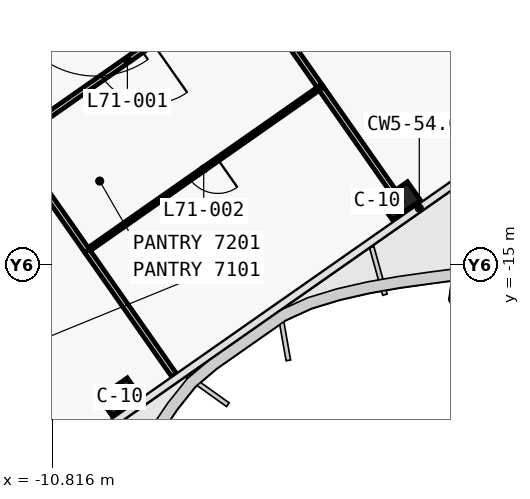
"""IFC4 building model, lengths in metres.
Left out: names, types, materials, properties, quantities, classifications, styles, units other than length and angle.
Written with IfcOpenShell. Run it as: python <this file> out.ifc"""

import sys

from ifc_helpers import new_model, si_unit, direction, frame, frame_2d, origin, origin_2d, place, context, subcontext, project, spatial, polyline, rectangle, outline, extrude, element, fill, save


model = new_model("IFC4")
c1 = context("Model", 3, precision=1e-05, world=origin(), true_north=direction((0.0, 1.0)))
c2 = subcontext(c1, "Body", "Model", "MODEL_VIEW")
j1 = project(units=[si_unit("LENGTHUNIT", "METRE"), si_unit("PLANEANGLEUNIT", "RADIAN")], contexts=[c1])
p1 = place(None, origin())
s1 = spatial("IfcSite", under=j1, at=p1, CompositionType="ELEMENT")
p2 = place(p1, origin())
s2 = spatial("IfcBuilding", under=s1, at=p2, CompositionType="ELEMENT")
p3 = place(p2, frame((0.0, 0.0, 299.5)))
s3 = spatial("IfcBuildingStorey", under=s2, at=p3, CompositionType="ELEMENT", Elevation=299.5)
p4 = place(p3, frame((-0.028, -0.874, 0.0), z_axis=(0.0, 0.0, 1.0), x_axis=(-0.819150035022, -0.573579305871, 0.0)))
e1 = element("IfcWall", 1, at=p4, inside=s3, PredefinedType="SHEAR", context=c2, shape_type="SweptSolid", body=[
    extrude(outline(polyline([(26.476, 0.3), (0.42, 0.3), (0.0, -0.3), (26.476, -0.3), (26.476, 0.3)])), origin(), (0.0, 0.0, 1.0), 3.9),
])
p5 = place(p4, frame((2.976, 0.0, 0.0)))
e2 = element("IfcOpeningElement", 2, at=p5, cuts=e1, PredefinedType="OPENING", context=c2, shape_type="SweptSolid", body=[
    extrude(rectangle(XDim=2.4, YDim=2.1, at=frame_2d((1.2, 1.05))), frame((0.0, 0.31, 0.0), z_axis=(0.0, -1.0, 0.0), x_axis=(1.0, 0.0, 0.0)), (0.0, 0.0, 1.0), 0.62),
])
p6 = place(p4, frame((11.776, 0.0, 0.0)))
e3 = element("IfcOpeningElement", 3, at=p6, cuts=e1, PredefinedType="OPENING", context=c2, shape_type="SweptSolid", body=[
    extrude(rectangle(XDim=2.4, YDim=2.1, at=frame_2d((1.2, 1.05))), frame((0.0, 0.31, 0.0), z_axis=(0.0, -1.0, 0.0), x_axis=(1.0, 0.0, 0.0)), (0.0, 0.0, 1.0), 0.62),
])
p7 = place(p3, frame((-2.638, 3.768, 0.0), z_axis=(0.0, 0.0, 1.0), x_axis=(-0.819155014212, -0.573572194837, 0.0)))
e4 = element("IfcWall", 4, at=p7, inside=s3, PredefinedType="SHEAR", context=c2, shape_type="SweptSolid", body=[
    extrude(outline(polyline([(26.4, 0.15), (0.0, 0.15), (0.0, -0.15), (26.4, -0.15), (26.4, 0.15)])), origin(), (0.0, 0.0, 1.0), 3.9),
])
p8 = place(p7, frame((1.169, 0.0, 0.0)))
e5 = element("IfcOpeningElement", 5, at=p8, cuts=e4, PredefinedType="OPENING", context=c2, shape_type="SweptSolid", body=[
    extrude(rectangle(XDim=1.1, YDim=2.1, at=frame_2d((0.55, 1.05))), frame((0.0, 0.16, 0.0), z_axis=(0.0, -1.0, 0.0), x_axis=(1.0, 0.0, 0.0)), (0.0, 0.0, 1.0), 0.32),
])
p9 = place(p7, frame((3.206, 0.0, 0.0)))
e6 = element("IfcOpeningElement", 6, at=p9, cuts=e4, PredefinedType="OPENING", context=c2, shape_type="SweptSolid", body=[
    extrude(rectangle(XDim=1.1, YDim=2.1, at=frame_2d((0.55, 1.05))), frame((0.0, 0.16, 0.0), z_axis=(0.0, -1.0, 0.0), x_axis=(1.0, 0.0, 0.0)), (0.0, 0.0, 1.0), 0.32),
])
p10 = place(p7, frame((5.244, 0.0, 0.0)))
e7 = element("IfcOpeningElement", 7, at=p10, cuts=e4, PredefinedType="OPENING", context=c2, shape_type="SweptSolid", body=[
    extrude(rectangle(XDim=1.1, YDim=2.1, at=frame_2d((0.55, 1.05))), frame((0.0, 0.16, 0.0), z_axis=(0.0, -1.0, 0.0), x_axis=(1.0, 0.0, 0.0)), (0.0, 0.0, 1.0), 0.32),
])
p11 = place(p7, frame((7.281, 0.0, 0.0)))
e8 = element("IfcOpeningElement", 8, at=p11, cuts=e4, PredefinedType="OPENING", context=c2, shape_type="SweptSolid", body=[
    extrude(rectangle(XDim=1.1, YDim=2.1, at=frame_2d((0.55, 1.05))), frame((0.0, 0.16, 0.0), z_axis=(0.0, -1.0, 0.0), x_axis=(1.0, 0.0, 0.0)), (0.0, 0.0, 1.0), 0.32),
])
p12 = place(p7, frame((9.688, 0.0, 0.0)))
e9 = element("IfcOpeningElement", 9, at=p12, cuts=e4, PredefinedType="OPENING", context=c2, shape_type="SweptSolid", body=[
    extrude(rectangle(XDim=1.1, YDim=2.1, at=frame_2d((0.55, 1.05))), frame((0.0, 0.16, 0.0), z_axis=(0.0, -1.0, 0.0), x_axis=(1.0, 0.0, 0.0)), (0.0, 0.0, 1.0), 0.32),
])
p13 = place(p7, frame((11.863, 0.0, 0.0)))
e10 = element("IfcOpeningElement", 10, at=p13, cuts=e4, PredefinedType="OPENING", context=c2, shape_type="SweptSolid", body=[
    extrude(rectangle(XDim=1.1, YDim=2.1, at=frame_2d((0.55, 1.05))), frame((0.0, 0.16, 0.0), z_axis=(0.0, -1.0, 0.0), x_axis=(1.0, 0.0, 0.0)), (0.0, 0.0, 1.0), 0.32),
])
p14 = place(p7, frame((13.722, 0.0, 0.0)))
e11 = element("IfcOpeningElement", 11, at=p14, cuts=e4, PredefinedType="OPENING", context=c2, shape_type="SweptSolid", body=[
    extrude(rectangle(XDim=1.0, YDim=2.1, at=frame_2d((0.5, 1.05))), frame((0.0, 0.16, 0.0), z_axis=(0.0, -1.0, 0.0), x_axis=(1.0, 0.0, 0.0)), (0.0, 0.0, 1.0), 0.32),
])
p15 = place(p7, frame((15.798, 0.0, 0.0)))
e12 = element("IfcOpeningElement", 12, at=p15, cuts=e4, PredefinedType="OPENING", context=c2, shape_type="SweptSolid", body=[
    extrude(rectangle(XDim=1.0, YDim=2.1, at=frame_2d((0.5, 1.05))), frame((0.0, 0.16, 0.0), z_axis=(0.0, -1.0, 0.0), x_axis=(1.0, 0.0, 0.0)), (0.0, 0.0, 1.0), 0.32),
])
for number, where, z_axis, x_axis in (
    (13, (-1.665, -13.313, 0.0), (0.0, 0.0, 1.0), (-0.819, -0.574, 0.0)),
    (14, (-9.038, -18.475, 0.0), (0.0, 0.0, 1.0), (-0.819, -0.574, 0.0)),
):
    element("IfcColumn", number, at=place(p3, frame(where, z_axis=z_axis, x_axis=x_axis)), inside=s3, PredefinedType="COLUMN", context=c2, shape_type="SweptSolid", body=[
        extrude(rectangle(XDim=0.9, YDim=0.6, at=origin_2d()), origin(), (0.0, 0.0, 1.0), 3.9),
    ])
p16 = place(p3, frame((-5.766, -7.456, 0.0), z_axis=(0.0, 0.0, 1.0), x_axis=(-0.819150881364, -0.573578097177, 0.0)))
e15 = element("IfcWall", 15, at=p16, inside=s3, PredefinedType="PARTITIONING", context=c2, shape_type="SweptSolid", body=[
    extrude(rectangle(XDim=7.502, YDim=0.15, at=frame_2d((3.751, 0.0))), origin(), (0.0, 0.0, 1.0), 3.05),
])
p17 = place(p16, frame((2.951, 0.0, 0.0)))
e16 = element("IfcOpeningElement", 16, at=p17, cuts=e15, PredefinedType="OPENING", context=c2, shape_type="SweptSolid", body=[
    extrude(rectangle(XDim=1.6, YDim=2.1, at=frame_2d((0.8, 1.05))), frame((0.0, 0.085, 0.0), z_axis=(0.0, -1.0, 0.0), x_axis=(1.0, 0.0, 0.0)), (0.0, 0.0, 1.0), 0.17),
])
p18 = place(p3, frame((-1.849, -13.051, 0.0), z_axis=(0.0, 0.0, 1.0), x_axis=(-0.573600070244, 0.819135495151, 0.0)))
e17 = element("IfcWall", 17, at=p18, inside=s3, PredefinedType="PARTITIONING", context=c2, shape_type="SweptSolid", body=[
    extrude(rectangle(XDim=3.331, YDim=0.15, at=frame_2d((1.666, 0.0))), origin(), (0.0, 0.0, 1.0), 3.05),
])
p19 = place(p3, frame((-3.758, -10.324, 0.0), z_axis=(0.0, 0.0, 1.0), x_axis=(-0.573560539213, 0.819163175355, 0.0)))
e18 = element("IfcWall", 18, at=p19, inside=s3, PredefinedType="PARTITIONING", context=c2, shape_type="SweptSolid", body=[
    extrude(rectangle(XDim=3.504, YDim=0.15, at=frame_2d((1.752, 0.0))), origin(), (0.0, 0.0, 1.0), 3.05),
])
p20 = place(p3, frame((-3.758, -10.324, 0.0), z_axis=(0.0, 0.0, 1.0), x_axis=(-0.81915238829, -0.573575945067, 0.0)))
e19 = element("IfcWall", 19, at=p20, inside=s3, PredefinedType="PARTITIONING", context=c2, shape_type="SweptSolid", body=[
    extrude(rectangle(XDim=7.5, YDim=0.1, at=frame_2d((3.75, 0.0))), origin(), (0.0, 0.0, 1.0), 3.05),
])
p21 = place(p20, frame((3.3, 0.0, 0.0)))
e20 = element("IfcOpeningElement", 20, at=p21, cuts=e19, PredefinedType="OPENING", context=c2, shape_type="SweptSolid", body=[
    extrude(rectangle(XDim=0.9, YDim=2.1, at=frame_2d((0.45, 1.05))), frame((0.0, 0.06, 0.0), z_axis=(0.0, -1.0, 0.0), x_axis=(1.0, 0.0, 0.0)), (0.0, 0.0, 1.0), 0.12),
])
p22 = place(p3, frame((-7.608, -17.901, 0.0), z_axis=(0.0, 0.0, 1.0), x_axis=(-0.573560675104, 0.819163080207, 0.0)))
e21 = element("IfcWall", 21, at=p22, inside=s3, PredefinedType="PARTITIONING", context=c2, shape_type="SweptSolid", body=[
    extrude(rectangle(XDim=3.999, YDim=0.15, at=frame_2d((2.0, 0.0))), origin(), (0.0, 0.0, 1.0), 3.0),
])
p23 = place(p3, frame((-9.903, -14.625, 0.0), z_axis=(0.0, 0.0, 1.0), x_axis=(-0.573518520844, 0.819192594113, 0.0)))
e22 = element("IfcWall", 22, at=p23, inside=s3, PredefinedType="PARTITIONING", context=c2, shape_type="SweptSolid", body=[
    extrude(rectangle(XDim=3.5, YDim=0.15, at=frame_2d((1.75, 0.0))), origin(), (0.0, 0.0, 1.0), 3.62),
])
p24 = place(p17, origin())
e23 = element("IfcDoor", 23, at=p24, inside=s3, OperationType="DOUBLE_DOOR_SINGLE_SWING", PredefinedType="DOOR", context=c2, shape_type="SweptSolid", body=[
    extrude(rectangle(XDim=1.6, YDim=2.1, at=frame_2d((0.8, 1.05))), frame((0.0, 0.025, 0.0), z_axis=(0.0, -1.0, 0.0), x_axis=(1.0, 0.0, 0.0)), (0.0, 0.0, 1.0), 0.05),
])
fill(e16, e23)
p25 = place(p21, origin())
e24 = element("IfcDoor", 24, at=p25, inside=s3, OperationType="SINGLE_SWING_RIGHT", PredefinedType="DOOR", context=c2, shape_type="SweptSolid", body=[
    extrude(rectangle(XDim=0.9, YDim=2.1, at=frame_2d((0.45, 1.05))), frame((0.0, 0.025, 0.0), z_axis=(0.0, -1.0, 0.0), x_axis=(1.0, 0.0, 0.0)), (0.0, 0.0, 1.0), 0.05),
])
fill(e20, e24)
save(model, sys.argv[1])
